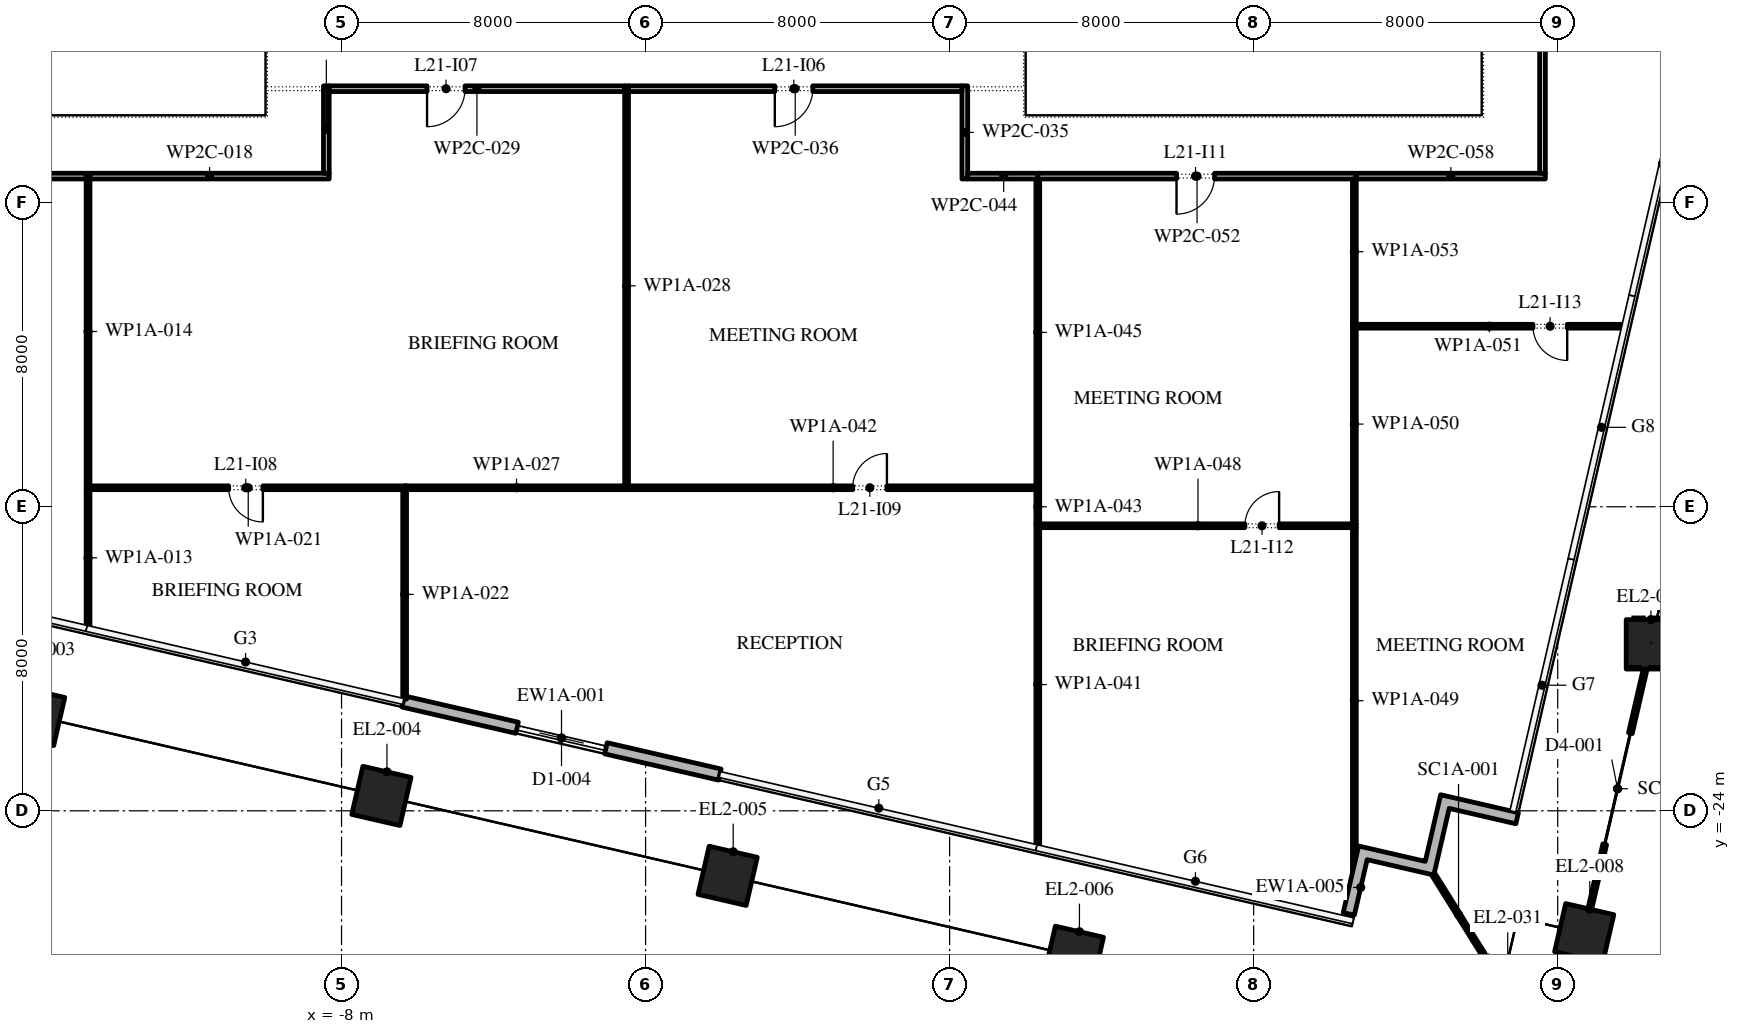
"""IFC4 building model, lengths in metres.
Left out: names, types, materials, properties, quantities, classifications, styles, units other than length and angle.
Written with IfcOpenShell. Run it as: python <this file> out.ifc"""

import sys

from ifc_helpers import new_model, si_unit, direction, frame, frame_2d, origin, origin_2d, place, context, subcontext, project, spatial, polyline, rectangle, outline, extrude, element, fill, save


model = new_model("IFC4")
c1 = context("Model", 3, precision=1e-05, world=origin(), true_north=direction((0.0, 1.0)))
c2 = subcontext(c1, "Body", "Model", "MODEL_VIEW")
j1 = project(units=[si_unit("LENGTHUNIT", "METRE"), si_unit("PLANEANGLEUNIT", "RADIAN")], contexts=[c1])
p1 = place(None, origin())
s1 = spatial("IfcSite", under=j1, at=p1, CompositionType="ELEMENT")
p2 = place(p1, origin())
s2 = spatial("IfcBuilding", under=s1, at=p2, CompositionType="ELEMENT")
p3 = place(p2, frame((0.0, 0.0, 99.6)))
s3 = spatial("IfcBuildingStorey", under=s2, at=p3, CompositionType="ELEMENT", Elevation=99.6)
for number, where, z_axis, x_axis in (
    (1, (-16.061, -21.505, 0.0), (0.0, 0.0, 1.0), (0.974, -0.225, 0.0)),
    (2, (-6.951, -23.608, 0.0), (0.0, 0.0, 1.0), (0.974, -0.225, 0.0)),
    (3, (2.159, -25.711, 0.0), (0.0, 0.0, 1.0), (0.974, -0.225, 0.0)),
    (4, (11.27, -27.815, 0.0), (0.0, 0.0, 1.0), (0.974, -0.225, 0.0)),
    (5, (24.698, -27.22, 0.0), (0.0, 0.0, 1.0), (0.974, -0.225, 0.0)),
):
    element("IfcColumn", number, at=place(p3, frame(where, z_axis=z_axis, x_axis=x_axis)), inside=s3, PredefinedType="COLUMN", context=c2, shape_type="SweptSolid", body=[
        extrude(rectangle(XDim=1.3, YDim=1.3, at=origin_2d()), origin(), (0.0, 0.0, 1.0), 6.0),
    ])
p4 = place(p3, frame((26.452, -19.62, 0.0), z_axis=(0.002888754049, 0.012653556469, 0.999915767757), x_axis=(-0.974916839878, 0.222569439329, 0.0)))
e6 = element("IfcColumn", 6, at=p4, inside=s3, PredefinedType="COLUMN", context=c2, shape_type="SweptSolid", body=[
    extrude(rectangle(XDim=1.3, YDim=1.3, at=origin_2d()), origin(), (0.0, 0.0, 1.0), 6.0),
])
p5 = place(p3, frame((22.539, -28.569, 0.0), z_axis=(0.0, 0.0, 1.0), x_axis=(0.974370064785, -0.224951054344, 0.0)))
e7 = element("IfcColumn", 7, at=p5, inside=s3, PredefinedType="COLUMN", context=c2, shape_type="SweptSolid", body=[
    extrude(rectangle(XDim=1.3, YDim=1.3, at=origin_2d()), origin(), (0.0, 0.0, 1.0), 6.0),
])
p6 = place(p3, frame((-6.377, -21.123, 0.0), z_axis=(0.0, 0.0, 1.0), x_axis=(0.974370979495, -0.224947092265, 0.0)))
e8 = element("IfcWall", 8, at=p6, inside=s3, PredefinedType="STANDARD", context=c2, shape_type="SweptSolid", body=[
    extrude(rectangle(XDim=8.55, YDim=0.3, at=frame_2d((4.275, 0.0))), origin(), (0.0, 0.0, 1.0), 5.8),
])
p7 = place(p6, frame((3.075, 0.0, 0.0)))
e9 = element("IfcOpeningElement", 9, at=p7, cuts=e8, PredefinedType="OPENING", context=c2, shape_type="SweptSolid", body=[
    extrude(rectangle(XDim=2.4, YDim=3.5, at=frame_2d((1.2, 1.75))), frame((0.0, 0.16, 0.0), z_axis=(0.0, -1.0, 0.0), x_axis=(1.0, 0.0, 0.0)), (0.0, 0.0, 1.0), 0.32),
])
p8 = place(p3, origin())
e10 = element("IfcWall", 10, at=p8, inside=s3, PredefinedType="STANDARD", context=c2, shape_type="SweptSolid", body=[
    extrude(outline(polyline([(20.515, -25.331), (20.92, -23.577), (22.967, -24.049), (22.899, -24.342), (21.145, -23.937), (20.74, -25.691), (18.986, -25.286), (18.649, -26.747), (18.357, -26.68), (18.762, -24.926), (20.515, -25.331)])), origin(), (0.0, 0.0, 1.0), 5.8),
])
p9 = place(p3, frame((20.74, -25.691, 0.0), z_axis=(0.0, 0.0, 1.0), x_axis=(0.529972121605, -0.848015064914, 0.0)))
e11 = element("IfcWall", 11, at=p9, inside=s3, PredefinedType="STANDARD", context=c2, shape_type="SweptSolid", body=[
    extrude(rectangle(XDim=2.455, YDim=0.1, at=frame_2d((1.228, 0.0))), origin(), (0.0, 0.0, 1.0), 5.8),
])
p10 = place(p3, frame((24.848, -26.567, 0.0), z_axis=(0.0, 0.0, 1.0), x_axis=(0.224942310176, 0.974372083494, 0.0)))
e12 = element("IfcWall", 12, at=p10, inside=s3, PredefinedType="STANDARD", context=c2, shape_type="SweptSolid", body=[
    extrude(rectangle(XDim=6.46, YDim=0.1, at=frame_2d((3.23, 0.0))), origin(), (0.0, 0.0, 1.0), 4.85),
])
p11 = place(p10, frame((1.73, 0.0, 0.0)))
e13 = element("IfcOpeningElement", 13, at=p11, cuts=e12, PredefinedType="OPENING", context=c2, shape_type="SweptSolid", body=[
    extrude(rectangle(XDim=3.0, YDim=3.5, at=frame_2d((1.5, 1.75))), frame((0.0, 0.06, 0.0), z_axis=(0.0, -1.0, 0.0), x_axis=(1.0, 0.0, 0.0)), (0.0, 0.0, 1.0), 0.12),
])
p12 = place(p3, frame((-14.67, -19.138, 0.0), z_axis=(0.0, 0.0, 1.0), x_axis=(0.0, 1.0, 0.0)))
e14 = element("IfcWall", 14, at=p12, inside=s3, PredefinedType="PARTITIONING", context=c2, shape_type="SweptSolid", body=[
    extrude(rectangle(XDim=3.588, YDim=0.1, at=frame_2d((1.794, 0.0))), origin(), (0.0, 0.0, 1.0), 5.8),
])
p13 = place(p3, frame((-14.67, -15.55, 0.0), z_axis=(0.0, 0.0, 1.0), x_axis=(0.0, 1.0, 0.0)))
e15 = element("IfcWall", 15, at=p13, inside=s3, PredefinedType="PARTITIONING", context=c2, shape_type="SweptSolid", body=[
    extrude(rectangle(XDim=8.325, YDim=0.1, at=frame_2d((4.163, 0.0))), origin(), (0.0, 0.0, 1.0), 5.8),
])
p14 = place(p3, frame((-14.72, -7.3, 0.0), z_axis=(0.0, 0.0, 1.0), x_axis=(-1.0, 0.0, 0.0)))
e16 = element("IfcWall", 16, at=p14, inside=s3, PredefinedType="PARTITIONING", context=c2, shape_type="SweptSolid", body=[
    extrude(rectangle(XDim=8.24, YDim=0.15, at=frame_2d((4.12, 0.0))), origin(), (0.0, 0.0, 1.0), 5.8),
])
p15 = place(p14, frame((2.89, 0.0, 0.0)))
e17 = element("IfcOpeningElement", 17, at=p15, cuts=e16, PredefinedType="OPENING", context=c2, shape_type="SweptSolid", body=[
    extrude(rectangle(XDim=1.0, YDim=2.1, at=frame_2d((0.5, 1.05))), frame((0.0, 0.085, 0.0), z_axis=(0.0, -1.0, 0.0), x_axis=(1.0, 0.0, 0.0)), (0.0, 0.0, 1.0), 0.17),
])
p16 = place(p3, frame((-8.325, -7.3, 0.0), z_axis=(0.0, 0.0, 1.0), x_axis=(-1.0, 0.0, 0.0)))
e18 = element("IfcWall", 18, at=p16, inside=s3, PredefinedType="PARTITIONING", context=c2, shape_type="SweptSolid", body=[
    extrude(rectangle(XDim=6.295, YDim=0.15, at=frame_2d((3.147, 0.0))), origin(), (0.0, 0.0, 1.0), 5.8),
])
p17 = place(p3, frame((-8.4, -4.925, 0.0), z_axis=(0.0, 0.0, 1.0), x_axis=(0.0, -1.0, 0.0)))
e19 = element("IfcWall", 19, at=p17, inside=s3, PredefinedType="PARTITIONING", context=c2, shape_type="SweptSolid", body=[
    extrude(rectangle(XDim=2.3, YDim=0.15, at=frame_2d((1.15, 0.0))), origin(), (0.0, 0.0, 1.0), 5.8),
])
p18 = place(p3, frame((-6.29, -15.5, 0.0), z_axis=(0.0, 0.0, 1.0), x_axis=(-1.0, 0.0, 0.0)))
e20 = element("IfcWall", 20, at=p18, inside=s3, PredefinedType="PARTITIONING", context=c2, shape_type="SweptSolid", body=[
    extrude(rectangle(XDim=8.33, YDim=0.1, at=frame_2d((4.165, 0.0))), origin(), (0.0, 0.0, 1.0), 5.8),
])
p19 = place(p18, frame((3.78, 0.0, 0.0)))
e21 = element("IfcOpeningElement", 21, at=p19, cuts=e20, PredefinedType="OPENING", context=c2, shape_type="SweptSolid", body=[
    extrude(rectangle(XDim=0.9, YDim=2.1, at=frame_2d((0.45, 1.05))), frame((0.0, 0.06, 0.0), z_axis=(0.0, -1.0, 0.0), x_axis=(1.0, 0.0, 0.0)), (0.0, 0.0, 1.0), 0.12),
])
p20 = place(p3, frame((-6.34, -15.55, 0.0), z_axis=(0.0, 0.0, 1.0), x_axis=(0.0, -1.0, 0.0)))
e22 = element("IfcWall", 22, at=p20, inside=s3, PredefinedType="PARTITIONING", context=c2, shape_type="SweptSolid", body=[
    extrude(rectangle(XDim=5.511, YDim=0.1, at=frame_2d((2.755, 0.0))), origin(), (0.0, 0.0, 1.0), 5.8),
])
p21 = place(p3, frame((-0.45, -15.5, 0.0), z_axis=(0.0, 0.0, 1.0), x_axis=(-1.0, 0.0, 0.0)))
e23 = element("IfcWall", 23, at=p21, inside=s3, PredefinedType="PARTITIONING", context=c2, shape_type="SweptSolid", body=[
    extrude(rectangle(XDim=5.89, YDim=0.1, at=frame_2d((2.945, 0.0))), origin(), (0.0, 0.0, 1.0), 5.8),
])
p22 = place(p3, frame((-0.5, -15.45, 0.0), z_axis=(0.0, 0.0, 1.0), x_axis=(0.0, 1.0, 0.0)))
e24 = element("IfcWall", 24, at=p22, inside=s3, PredefinedType="PARTITIONING", context=c2, shape_type="SweptSolid", body=[
    extrude(rectangle(XDim=10.525, YDim=0.1, at=frame_2d((5.262, 0.0))), origin(), (0.0, 0.0, 1.0), 5.8),
])
p23 = place(p3, frame((-0.55, -5.0, 0.0), z_axis=(0.0, 0.0, 1.0), x_axis=(-1.0, 0.0, 0.0)))
e25 = element("IfcWall", 25, at=p23, inside=s3, PredefinedType="PARTITIONING", context=c2, shape_type="SweptSolid", body=[
    extrude(rectangle(XDim=7.775, YDim=0.15, at=frame_2d((3.887, 0.0))), origin(), (0.0, 0.0, 1.0), 5.8),
])
p24 = place(p23, frame((4.2, 0.0, 0.0)))
e26 = element("IfcOpeningElement", 26, at=p24, cuts=e25, PredefinedType="OPENING", context=c2, shape_type="SweptSolid", body=[
    extrude(rectangle(XDim=1.0, YDim=2.1, at=frame_2d((0.5, 1.05))), frame((0.0, 0.085, 0.0), z_axis=(0.0, -1.0, 0.0), x_axis=(1.0, 0.0, 0.0)), (0.0, 0.0, 1.0), 0.17),
])
p25 = place(p3, frame((8.4, -7.375, 0.0), z_axis=(0.0, 0.0, 1.0), x_axis=(0.0, 1.0, 0.0)))
e27 = element("IfcWall", 27, at=p25, inside=s3, PredefinedType="PARTITIONING", context=c2, shape_type="SweptSolid", body=[
    extrude(rectangle(XDim=2.45, YDim=0.15, at=frame_2d((1.225, 0.0))), origin(), (0.0, 0.0, 1.0), 5.8),
])
p26 = place(p3, frame((8.325, -5.0, 0.0), z_axis=(0.0, 0.0, 1.0), x_axis=(-1.0, 0.0, 0.0)))
e28 = element("IfcWall", 28, at=p26, inside=s3, PredefinedType="PARTITIONING", context=c2, shape_type="SweptSolid", body=[
    extrude(rectangle(XDim=8.775, YDim=0.15, at=frame_2d((4.387, 0.0))), origin(), (0.0, 0.0, 1.0), 5.8),
])
p27 = place(p26, frame((3.925, 0.0, 0.0)))
e29 = element("IfcOpeningElement", 29, at=p27, cuts=e28, PredefinedType="OPENING", context=c2, shape_type="SweptSolid", body=[
    extrude(rectangle(XDim=1.0, YDim=2.1, at=frame_2d((0.5, 1.05))), frame((0.0, 0.085, 0.0), z_axis=(0.0, -1.0, 0.0), x_axis=(1.0, 0.0, 0.0)), (0.0, 0.0, 1.0), 0.17),
])
p28 = place(p3, frame((10.32, -16.45, 0.0), z_axis=(0.0, 0.0, 1.0), x_axis=(0.0, -1.0, 0.0)))
e30 = element("IfcWall", 30, at=p28, inside=s3, PredefinedType="PARTITIONING", context=c2, shape_type="SweptSolid", body=[
    extrude(rectangle(XDim=8.457, YDim=0.1, at=frame_2d((4.229, 0.0))), origin(), (0.0, 0.0, 1.0), 5.8),
])
p29 = place(p3, frame((10.37, -15.5, 0.0), z_axis=(0.0, 0.0, 1.0), x_axis=(-1.0, 0.0, 0.0)))
e31 = element("IfcWall", 31, at=p29, inside=s3, PredefinedType="PARTITIONING", context=c2, shape_type="SweptSolid", body=[
    extrude(rectangle(XDim=10.87, YDim=0.1, at=frame_2d((5.435, 0.0))), origin(), (0.0, 0.0, 1.0), 5.8),
])
p30 = place(p29, frame((4.02, 0.0, 0.0)))
e32 = element("IfcOpeningElement", 32, at=p30, cuts=e31, PredefinedType="OPENING", context=c2, shape_type="SweptSolid", body=[
    extrude(rectangle(XDim=0.9, YDim=2.1, at=frame_2d((0.45, 1.05))), frame((0.0, 0.06, 0.0), z_axis=(0.0, -1.0, 0.0), x_axis=(1.0, 0.0, 0.0)), (0.0, 0.0, 1.0), 0.12),
])
p31 = place(p3, frame((10.32, -15.55, 0.0), z_axis=(0.0, 0.0, 1.0), x_axis=(0.0, -1.0, 0.0)))
e33 = element("IfcWall", 33, at=p31, inside=s3, PredefinedType="PARTITIONING", context=c2, shape_type="SweptSolid", body=[
    extrude(rectangle(XDim=0.9, YDim=0.1, at=frame_2d((0.45, 0.0))), origin(), (0.0, 0.0, 1.0), 5.8),
])
p32 = place(p3, frame((10.37, -7.3, 0.0), z_axis=(0.0, 0.0, 1.0), x_axis=(-1.0, 0.0, 0.0)))
e34 = element("IfcWall", 34, at=p32, inside=s3, PredefinedType="PARTITIONING", context=c2, shape_type="SweptSolid", body=[
    extrude(rectangle(XDim=1.895, YDim=0.15, at=frame_2d((0.948, 0.0))), origin(), (0.0, 0.0, 1.0), 5.8),
])
p33 = place(p3, frame((10.32, -7.375, 0.0), z_axis=(0.0, 0.0, 1.0), x_axis=(0.0, -1.0, 0.0)))
e35 = element("IfcWall", 35, at=p33, inside=s3, PredefinedType="PARTITIONING", context=c2, shape_type="SweptSolid", body=[
    extrude(rectangle(XDim=8.075, YDim=0.1, at=frame_2d((4.038, 0.0))), origin(), (0.0, 0.0, 1.0), 5.8),
])
p34 = place(p3, frame((18.7, -16.5, 0.0), z_axis=(0.0, 0.0, 1.0), x_axis=(-1.0, 0.0, 0.0)))
e36 = element("IfcWall", 36, at=p34, inside=s3, PredefinedType="PARTITIONING", context=c2, shape_type="SweptSolid", body=[
    extrude(rectangle(XDim=8.33, YDim=0.1, at=frame_2d((4.165, 0.0))), origin(), (0.0, 0.0, 1.0), 5.8),
])
p35 = place(p34, frame((2.03, 0.0, 0.0)))
e37 = element("IfcOpeningElement", 37, at=p35, cuts=e36, PredefinedType="OPENING", context=c2, shape_type="SweptSolid", body=[
    extrude(rectangle(XDim=0.9, YDim=2.1, at=frame_2d((0.45, 1.05))), frame((0.0, 0.06, 0.0), z_axis=(0.0, -1.0, 0.0), x_axis=(1.0, 0.0, 0.0)), (0.0, 0.0, 1.0), 0.12),
])
p36 = place(p3, frame((18.65, -16.55, 0.0), z_axis=(0.0, 0.0, 1.0), x_axis=(0.0, -1.0, 0.0)))
e38 = element("IfcWall", 38, at=p36, inside=s3, PredefinedType="PARTITIONING", context=c2, shape_type="SweptSolid", body=[
    extrude(rectangle(XDim=9.104, YDim=0.1, at=frame_2d((4.552, 0.0))), origin(), (0.0, 0.0, 1.0), 5.8),
])
p37 = place(p3, frame((18.65, -11.2, 0.0), z_axis=(0.0, 0.0, 1.0), x_axis=(0.0, -1.0, 0.0)))
e39 = element("IfcWall", 39, at=p37, inside=s3, PredefinedType="PARTITIONING", context=c2, shape_type="SweptSolid", body=[
    extrude(rectangle(XDim=5.25, YDim=0.1, at=frame_2d((2.625, 0.0))), origin(), (0.0, 0.0, 1.0), 5.8),
])
p38 = place(p3, frame((18.7, -11.25, 0.0), z_axis=(0.0, 0.0, 1.0), x_axis=(1.0, 0.0, 0.0)))
e40 = element("IfcWall", 40, at=p38, inside=s3, PredefinedType="PARTITIONING", context=c2, shape_type="SweptSolid", body=[
    extrude(rectangle(XDim=6.996, YDim=0.1, at=frame_2d((3.498, 0.0))), origin(), (0.0, 0.0, 1.0), 5.8),
])
p39 = place(p38, frame((4.65, 0.0, 0.0)))
e41 = element("IfcOpeningElement", 41, at=p39, cuts=e40, PredefinedType="OPENING", context=c2, shape_type="SweptSolid", body=[
    extrude(rectangle(XDim=0.9, YDim=2.1, at=frame_2d((0.45, 1.05))), frame((0.0, 0.06, 0.0), z_axis=(0.0, -1.0, 0.0), x_axis=(1.0, 0.0, 0.0)), (0.0, 0.0, 1.0), 0.12),
])
p40 = place(p3, frame((18.7, -7.3, 0.0), z_axis=(0.0, 0.0, 1.0), x_axis=(-1.0, 0.0, 0.0)))
e42 = element("IfcWall", 42, at=p40, inside=s3, PredefinedType="PARTITIONING", context=c2, shape_type="SweptSolid", body=[
    extrude(rectangle(XDim=8.38, YDim=0.15, at=frame_2d((4.19, 0.0))), origin(), (0.0, 0.0, 1.0), 5.8),
])
p41 = place(p40, frame((3.73, 0.0, 0.0)))
e43 = element("IfcOpeningElement", 43, at=p41, cuts=e42, PredefinedType="OPENING", context=c2, shape_type="SweptSolid", body=[
    extrude(rectangle(XDim=1.0, YDim=2.1, at=frame_2d((0.5, 1.05))), frame((0.0, 0.085, 0.0), z_axis=(0.0, -1.0, 0.0), x_axis=(1.0, 0.0, 0.0)), (0.0, 0.0, 1.0), 0.17),
])
p42 = place(p3, frame((18.65, -7.375, 0.0), z_axis=(0.0, 0.0, 1.0), x_axis=(0.0, -1.0, 0.0)))
e44 = element("IfcWall", 44, at=p42, inside=s3, PredefinedType="PARTITIONING", context=c2, shape_type="SweptSolid", body=[
    extrude(rectangle(XDim=3.825, YDim=0.1, at=frame_2d((1.913, 0.0))), origin(), (0.0, 0.0, 1.0), 5.8),
])
p43 = place(p3, frame((23.675, -7.3, 0.0), z_axis=(0.0, 0.0, 1.0), x_axis=(-1.0, 0.0, 0.0)))
e45 = element("IfcWall", 45, at=p43, inside=s3, PredefinedType="PARTITIONING", context=c2, shape_type="SweptSolid", body=[
    extrude(rectangle(XDim=4.975, YDim=0.15, at=frame_2d((2.488, 0.0))), origin(), (0.0, 0.0, 1.0), 5.8),
])
p44 = place(p3, frame((23.6, 3.5, 0.0), z_axis=(0.0, 0.0, 1.0), x_axis=(0.0, -1.0, 0.0)))
e46 = element("IfcWall", 46, at=p44, inside=s3, PredefinedType="PARTITIONING", context=c2, shape_type="SweptSolid", body=[
    extrude(rectangle(XDim=10.725, YDim=0.15, at=frame_2d((5.363, 0.0))), origin(), (0.0, 0.0, 1.0), 5.8),
])
p45 = place(p44, frame((5.9, 0.0, 0.0)))
e47 = element("IfcOpeningElement", 47, at=p45, cuts=e46, PredefinedType="OPENING", context=c2, shape_type="SweptSolid", body=[
    extrude(rectangle(XDim=1.0, YDim=2.1, at=frame_2d((0.5, 1.05))), frame((0.0, 0.085, 0.0), z_axis=(0.0, -1.0, 0.0), x_axis=(1.0, 0.0, 0.0)), (0.0, 0.0, 1.0), 0.17),
])
p46 = place(p7, origin())
e48 = element("IfcDoor", 48, at=p46, inside=s3, OperationType="DOUBLE_DOOR_SLIDING", PredefinedType="DOOR", context=c2, shape_type="SweptSolid", body=[
    extrude(rectangle(XDim=2.4, YDim=3.5, at=frame_2d((1.2, 1.75))), frame((0.0, 0.025, 0.0), z_axis=(0.0, -1.0, 0.0), x_axis=(1.0, 0.0, 0.0)), (0.0, 0.0, 1.0), 0.05),
])
fill(e9, e48)
p47 = place(p11, origin())
e49 = element("IfcDoor", 49, at=p47, inside=s3, OperationType="DOUBLE_DOOR_SLIDING", PredefinedType="DOOR", context=c2, shape_type="SweptSolid", body=[
    extrude(rectangle(XDim=3.0, YDim=3.5, at=frame_2d((1.5, 1.75))), frame((0.0, 0.025, 0.0), z_axis=(0.0, -1.0, 0.0), x_axis=(1.0, 0.0, 0.0)), (0.0, 0.0, 1.0), 0.05),
])
fill(e13, e49)
p48 = place(p27, origin())
e50 = element("IfcDoor", 50, at=p48, inside=s3, OperationType="SINGLE_SWING_LEFT", PredefinedType="DOOR", context=c2, shape_type="SweptSolid", body=[
    extrude(rectangle(XDim=1.0, YDim=2.1, at=frame_2d((0.5, 1.05))), frame((0.0, 0.025, 0.0), z_axis=(0.0, -1.0, 0.0), x_axis=(1.0, 0.0, 0.0)), (0.0, 0.0, 1.0), 0.05),
])
fill(e29, e50)
p49 = place(p24, origin())
e51 = element("IfcDoor", 51, at=p49, inside=s3, OperationType="SINGLE_SWING_LEFT", PredefinedType="DOOR", context=c2, shape_type="SweptSolid", body=[
    extrude(rectangle(XDim=1.0, YDim=2.1, at=frame_2d((0.5, 1.05))), frame((0.0, 0.025, 0.0), z_axis=(0.0, -1.0, 0.0), x_axis=(1.0, 0.0, 0.0)), (0.0, 0.0, 1.0), 0.05),
])
fill(e26, e51)
p50 = place(p19, origin())
e52 = element("IfcDoor", 52, at=p50, inside=s3, OperationType="SINGLE_SWING_RIGHT", PredefinedType="DOOR", context=c2, shape_type="SweptSolid", body=[
    extrude(rectangle(XDim=0.9, YDim=2.1, at=frame_2d((0.45, 1.05))), frame((0.0, 0.025, 0.0), z_axis=(0.0, -1.0, 0.0), x_axis=(1.0, 0.0, 0.0)), (0.0, 0.0, 1.0), 0.05),
])
fill(e21, e52)
p51 = place(p30, frame((0.9, 0.0, 0.0), z_axis=(0.0, 0.0, 1.0), x_axis=(-1.0, 0.0, 0.0)))
e53 = element("IfcDoor", 53, at=p51, inside=s3, OperationType="SINGLE_SWING_LEFT", PredefinedType="DOOR", context=c2, shape_type="SweptSolid", body=[
    extrude(rectangle(XDim=0.9, YDim=2.1, at=frame_2d((0.45, 1.05))), frame((0.0, 0.025, 0.0), z_axis=(0.0, -1.0, 0.0), x_axis=(1.0, 0.0, 0.0)), (0.0, 0.0, 1.0), 0.05),
])
fill(e32, e53)
p52 = place(p41, origin())
e54 = element("IfcDoor", 54, at=p52, inside=s3, OperationType="SINGLE_SWING_LEFT", PredefinedType="DOOR", context=c2, shape_type="SweptSolid", body=[
    extrude(rectangle(XDim=1.0, YDim=2.1, at=frame_2d((0.5, 1.05))), frame((0.0, 0.025, 0.0), z_axis=(0.0, -1.0, 0.0), x_axis=(1.0, 0.0, 0.0)), (0.0, 0.0, 1.0), 0.05),
])
fill(e43, e54)
p53 = place(p35, frame((0.9, 0.0, 0.0), z_axis=(0.0, 0.0, 1.0), x_axis=(-1.0, 0.0, 0.0)))
e55 = element("IfcDoor", 55, at=p53, inside=s3, OperationType="SINGLE_SWING_LEFT", PredefinedType="DOOR", context=c2, shape_type="SweptSolid", body=[
    extrude(rectangle(XDim=0.9, YDim=2.1, at=frame_2d((0.45, 1.05))), frame((0.0, 0.025, 0.0), z_axis=(0.0, -1.0, 0.0), x_axis=(1.0, 0.0, 0.0)), (0.0, 0.0, 1.0), 0.05),
])
fill(e37, e55)
p54 = place(p39, frame((0.9, 0.0, 0.0), z_axis=(0.0, 0.0, 1.0), x_axis=(-1.0, 0.0, 0.0)))
e56 = element("IfcDoor", 56, at=p54, inside=s3, OperationType="SINGLE_SWING_RIGHT", PredefinedType="DOOR", context=c2, shape_type="SweptSolid", body=[
    extrude(rectangle(XDim=0.9, YDim=2.1, at=frame_2d((0.45, 1.05))), frame((0.0, 0.025, 0.0), z_axis=(0.0, -1.0, 0.0), x_axis=(1.0, 0.0, 0.0)), (0.0, 0.0, 1.0), 0.05),
])
fill(e41, e56)
save(model, sys.argv[1])
